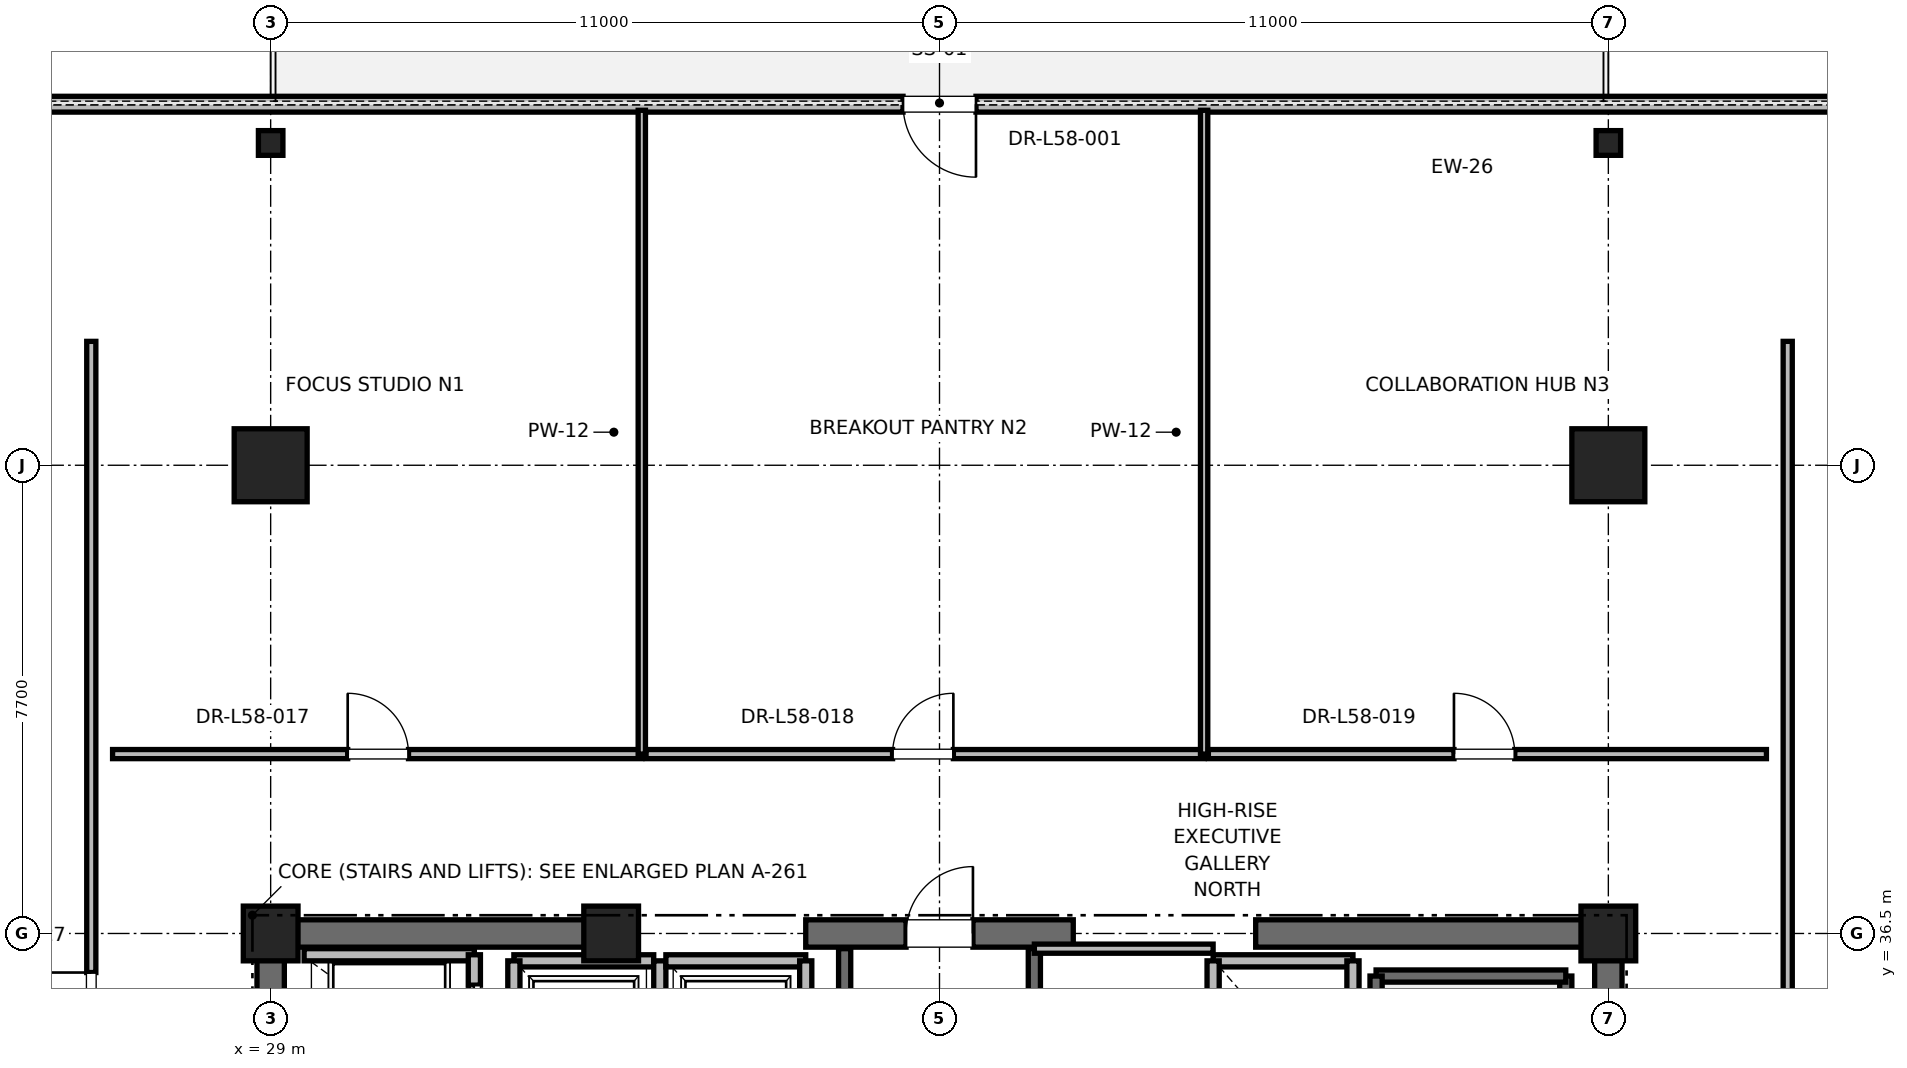
"""IFC4 building model, lengths in metres.
Left out: names, types, materials, properties, quantities, classifications, styles, units other than length and angle.
Written with IfcOpenShell. Run it as: python <this file> out.ifc"""

import sys

from ifc_helpers import new_model, si_unit, direction, frame, frame_2d, origin, origin_2d, place, context, subcontext, project, spatial, rectangle, i_section, extrude, element, fill, save


model = new_model("IFC4")
c1 = context("Model", 3, precision=1e-05, world=origin(), true_north=direction((0.0, 1.0)))
c2 = subcontext(c1, "Body", "Model", "MODEL_VIEW")
j1 = project(units=[si_unit("LENGTHUNIT", "METRE"), si_unit("PLANEANGLEUNIT", "RADIAN")], contexts=[c1])
p1 = place(None, origin())
s1 = spatial("IfcSite", under=j1, at=p1, CompositionType="ELEMENT")
p2 = place(p1, origin())
s2 = spatial("IfcBuilding", under=s1, at=p2, CompositionType="ELEMENT")
p3 = place(p2, frame((0.0, 0.0, 251.2)))
s3 = spatial("IfcBuildingStorey", under=s2, at=p3, CompositionType="ELEMENT", Elevation=251.2)
for number, where, z_axis, x_axis in (
    (1, (29.0, 44.2, 0.0), (0.0, 0.0, 1.0), (1.0, 0.0, 0.0)),
    (2, (51.0, 44.2, 0.0), (0.0, 0.0, 1.0), (1.0, 0.0, 0.0)),
):
    element("IfcColumn", number, at=place(p3, frame(where, z_axis=z_axis, x_axis=x_axis)), inside=s3, PredefinedType="COLUMN", context=c2, shape_type="SweptSolid", body=[
        extrude(rectangle(XDim=1.2, YDim=1.2, at=origin_2d()), origin(), (0.0, 0.0, 1.0), 4.0),
    ])
for number, where, z_axis, x_axis in (
    (3, (29.0, 49.5, 0.0), (0.0, 0.0, 1.0), (1.0, 0.0, 0.0)),
    (4, (51.0, 49.5, 0.0), (0.0, 0.0, 1.0), (1.0, 0.0, 0.0)),
):
    element("IfcColumn", number, at=place(p3, frame(where, z_axis=z_axis, x_axis=x_axis)), inside=s3, PredefinedType="COLUMN", context=c2, shape_type="SweptSolid", body=[
        extrude(i_section(OverallWidth=0.403, OverallDepth=0.406, WebThickness=0.027, FlangeThickness=0.043, FilletRadius=0.015, at=origin_2d()), origin(), (0.0, 0.0, 1.0), 4.0),
    ])
for number, where, z_axis, x_axis in (
    (5, (29.0, 36.5, 0.0), (0.0, 0.0, 1.0), (1.0, 0.0, 0.0)),
    (6, (51.0, 36.5, 0.0), (0.0, 0.0, 1.0), (1.0, 0.0, 0.0)),
    (7, (34.6, 36.5, 0.0), (0.0, 0.0, 1.0), (1.0, 0.0, 0.0)),
):
    element("IfcColumn", number, at=place(p3, frame(where, z_axis=z_axis, x_axis=x_axis)), inside=s3, PredefinedType="PILASTER", context=c2, shape_type="SweptSolid", body=[
        extrude(rectangle(XDim=0.9, YDim=0.9, at=origin_2d()), origin(), (0.0, 0.0, 1.0), 4.0),
    ])
p4 = place(p3, frame((29.0, 36.5, 0.0), z_axis=(0.0, 0.0, 1.0), x_axis=(1.0, 0.0, 0.0)))
e8 = element("IfcWall", 8, at=p4, inside=s3, PredefinedType="SHEAR", context=c2, shape_type="SweptSolid", body=[
    extrude(rectangle(XDim=5.8, YDim=0.45, at=frame_2d((2.9, 0.0))), origin(), (0.0, 0.0, 1.0), 3.785),
])
p5 = place(p3, frame((37.8, 36.5, 0.0), z_axis=(0.0, 0.0, 1.0), x_axis=(1.0, 0.0, 0.0)))
e9 = element("IfcWall", 9, at=p5, inside=s3, PredefinedType="SHEAR", context=c2, shape_type="SweptSolid", body=[
    extrude(rectangle(XDim=4.4, YDim=0.45, at=frame_2d((2.2, 0.0))), origin(), (0.0, 0.0, 1.0), 3.785),
])
p6 = place(p5, frame((1.65, 0.0, 0.0)))
e10 = element("IfcOpeningElement", 10, at=p6, cuts=e9, PredefinedType="OPENING", context=c2, shape_type="SweptSolid", body=[
    extrude(rectangle(XDim=1.1, YDim=2.15, at=frame_2d((0.55, 1.075))), frame((0.0, 0.225, 0.0), z_axis=(0.0, -1.0, 0.0), x_axis=(1.0, 0.0, 0.0)), (0.0, 0.0, 1.0), 0.45),
])
for number, where, z_axis, x_axis in (
    (11, (45.2, 36.5, 0.0), (0.0, 0.0, 1.0), (1.0, 0.0, 0.0)),
    (12, (29.0, 30.7, 0.0), (0.0, 0.0, 1.0), (0.0, 1.0, 0.0)),
):
    element("IfcWall", number, at=place(p3, frame(where, z_axis=z_axis, x_axis=x_axis)), inside=s3, PredefinedType="SHEAR", context=c2, shape_type="SweptSolid", body=[
        extrude(rectangle(XDim=5.8, YDim=0.45, at=frame_2d((2.9, 0.0))), origin(), (0.0, 0.0, 1.0), 3.785),
    ])
p7 = place(p3, frame((51.0, 27.7, 0.0), z_axis=(0.0, 0.0, 1.0), x_axis=(0.0, 1.0, 0.0)))
e13 = element("IfcWall", 13, at=p7, inside=s3, PredefinedType="SHEAR", context=c2, shape_type="SweptSolid", body=[
    extrude(rectangle(XDim=8.8, YDim=0.45, at=frame_2d((4.4, 0.0))), origin(), (0.0, 0.0, 1.0), 3.785),
])
p8 = place(p3, frame((62.396, 50.138, 0.0), z_axis=(0.0, 0.0, 1.0), x_axis=(-1.0, 0.0, 0.0)))
e14 = element("IfcWall", 14, at=p8, inside=s3, PredefinedType="PARAPET", context=c2, shape_type="SweptSolid", body=[
    extrude(rectangle(XDim=44.792, YDim=0.26, at=frame_2d((22.396, 0.0))), origin(), (0.0, 0.0, 1.0), 3.273),
])
p9 = place(p8, frame((4.2, 0.0, 0.85)))
e15 = element("IfcOpeningElement", 15, at=p9, cuts=e14, PredefinedType="OPENING", context=c2, shape_type="SweptSolid", body=[
    extrude(rectangle(XDim=1.6, YDim=2.1, at=frame_2d((0.8, 1.05))), frame((0.0, 0.13, 0.0), z_axis=(0.0, -1.0, 0.0), x_axis=(1.0, 0.0, 0.0)), (0.0, 0.0, 1.0), 0.26),
])
p10 = place(p8, frame((21.796, 0.0, 0.0)))
e16 = element("IfcOpeningElement", 16, at=p10, cuts=e14, PredefinedType="OPENING", context=c2, shape_type="SweptSolid", body=[
    extrude(rectangle(XDim=1.2, YDim=2.2, at=frame_2d((0.6, 1.1))), frame((0.0, 0.13, 0.0), z_axis=(0.0, -1.0, 0.0), x_axis=(1.0, 0.0, 0.0)), (0.0, 0.0, 1.0), 0.26),
])
p11 = place(p8, frame((38.993, 0.0, 0.85)))
e17 = element("IfcOpeningElement", 17, at=p11, cuts=e14, PredefinedType="OPENING", context=c2, shape_type="SweptSolid", body=[
    extrude(rectangle(XDim=1.6, YDim=2.1, at=frame_2d((0.8, 1.05))), frame((0.0, 0.13, 0.0), z_axis=(0.0, -1.0, 0.0), x_axis=(1.0, 0.0, 0.0)), (0.0, 0.0, 1.0), 0.26),
])
p12 = place(p3, frame((50.3, 27.65, 0.0), z_axis=(0.0, 0.0, 1.0), x_axis=(0.0, 1.0, 0.0)))
e18 = element("IfcWall", 18, at=p12, inside=s3, PredefinedType="SOLIDWALL", context=c2, shape_type="SweptSolid", body=[
    extrude(rectangle(XDim=8.15, YDim=0.2, at=frame_2d((4.075, 0.0))), origin(), (0.0, 0.0, 1.0), 3.785),
])
p13 = place(p3, frame((47.18, 35.8, 0.0), z_axis=(0.0, 0.0, 1.0), x_axis=(1.0, 0.0, 0.0)))
e19 = element("IfcWall", 19, at=p13, inside=s3, PredefinedType="SOLIDWALL", context=c2, shape_type="SweptSolid", body=[
    extrude(rectangle(XDim=3.12, YDim=0.2, at=frame_2d((1.56, 0.0))), origin(), (0.0, 0.0, 1.0), 3.785),
])
p14 = place(p3, frame((47.18, 27.62, 0.0), z_axis=(0.0, 0.0, 1.0), x_axis=(0.0, 1.0, 0.0)))
e20 = element("IfcWall", 20, at=p14, inside=s3, PredefinedType="SOLIDWALL", context=c2, shape_type="SweptSolid", body=[
    extrude(rectangle(XDim=8.18, YDim=0.2, at=frame_2d((4.09, 0.0))), origin(), (0.0, 0.0, 1.0), 3.785),
])
p15 = place(p3, frame((38.44, 27.38, 0.0), z_axis=(0.0, 0.0, 1.0), x_axis=(0.0, 1.0, 0.0)))
e21 = element("IfcWall", 21, at=p15, inside=s3, PredefinedType="SOLIDWALL", context=c2, shape_type="SweptSolid", body=[
    extrude(rectangle(XDim=8.87, YDim=0.2, at=frame_2d((4.435, 0.0))), origin(), (0.0, 0.0, 1.0), 3.785),
])
p16 = place(p3, frame((41.56, 27.68, 0.0), z_axis=(0.0, 0.0, 1.0), x_axis=(0.0, 1.0, 0.0)))
e22 = element("IfcWall", 22, at=p16, inside=s3, PredefinedType="SOLIDWALL", context=c2, shape_type="SweptSolid", body=[
    extrude(rectangle(XDim=8.57, YDim=0.2, at=frame_2d((4.285, 0.0))), origin(), (0.0, 0.0, 1.0), 3.785),
])
p17 = place(p3, frame((32.35, 36.15, 0.0), z_axis=(0.0, 0.0, 1.0), x_axis=(-1.0, 0.0, 0.0)))
e23 = element("IfcWall", 23, at=p17, inside=s3, PredefinedType="SOLIDWALL", context=c2, shape_type="SweptSolid", body=[
    extrude(rectangle(XDim=2.8, YDim=0.2, at=frame_2d((1.4, 0.0))), origin(), (0.0, 0.0, 1.0), 3.148),
])
p18 = place(p3, frame((32.35, 34.05, 0.0), z_axis=(0.0, 0.0, 1.0), x_axis=(0.0, 1.0, 0.0)))
e24 = element("IfcWall", 24, at=p18, inside=s3, PredefinedType="SOLIDWALL", context=c2, shape_type="SweptSolid", body=[
    extrude(rectangle(XDim=2.1, YDim=0.2, at=frame_2d((1.05, 0.0))), origin(), (0.0, 0.0, 1.0), 3.785),
])
p19 = place(p18, frame((0.5, 0.0, 0.0)))
e25 = element("IfcOpeningElement", 25, at=p19, cuts=e24, PredefinedType="OPENING", context=c2, shape_type="SweptSolid", body=[
    extrude(rectangle(XDim=1.1, YDim=2.2, at=frame_2d((0.55, 1.1))), frame((0.0, 0.1, 0.0), z_axis=(0.0, -1.0, 0.0), x_axis=(1.0, 0.0, 0.0)), (0.0, 0.0, 1.0), 0.2),
])
p20 = place(p3, frame((35.3, 36.05, 0.0), z_axis=(0.0, 0.0, 1.0), x_axis=(-1.0, 0.0, 0.0)))
e26 = element("IfcWall", 26, at=p20, inside=s3, PredefinedType="SOLIDWALL", context=c2, shape_type="SweptSolid", body=[
    extrude(rectangle(XDim=2.3, YDim=0.2, at=frame_2d((1.15, 0.0))), origin(), (0.0, 0.0, 1.0), 2.865),
])
p21 = place(p3, frame((33.0, 36.05, 0.0), z_axis=(0.0, 0.0, 1.0), x_axis=(0.0, -1.0, 0.0)))
e27 = element("IfcWall", 27, at=p21, inside=s3, PredefinedType="SOLIDWALL", context=c2, shape_type="SweptSolid", body=[
    extrude(rectangle(XDim=2.6, YDim=0.2, at=frame_2d((1.3, 0.0))), origin(), (0.0, 0.0, 1.0), 3.785),
])
p22 = place(p3, frame((35.4, 33.45, 0.0), z_axis=(0.0, 0.0, 1.0), x_axis=(0.0, 1.0, 0.0)))
e28 = element("IfcWall", 28, at=p22, inside=s3, PredefinedType="SOLIDWALL", context=c2, shape_type="SweptSolid", body=[
    extrude(rectangle(XDim=2.6, YDim=0.2, at=frame_2d((1.3, 0.0))), origin(), (0.0, 0.0, 1.0), 2.865),
])
p23 = place(p3, frame((37.8, 36.05, 0.0), z_axis=(0.0, 0.0, 1.0), x_axis=(-1.0, 0.0, 0.0)))
e29 = element("IfcWall", 29, at=p23, inside=s3, PredefinedType="SOLIDWALL", context=c2, shape_type="SweptSolid", body=[
    extrude(rectangle(XDim=2.3, YDim=0.2, at=frame_2d((1.15, 0.0))), origin(), (0.0, 0.0, 1.0), 2.865),
])
p24 = place(p3, frame((37.8, 33.45, 0.0), z_axis=(0.0, 0.0, 1.0), x_axis=(0.0, 1.0, 0.0)))
e30 = element("IfcWall", 30, at=p24, inside=s3, PredefinedType="SOLIDWALL", context=c2, shape_type="SweptSolid", body=[
    extrude(rectangle(XDim=2.6, YDim=0.2, at=frame_2d((1.3, 0.0))), origin(), (0.0, 0.0, 1.0), 2.865),
])
p25 = place(p3, frame((46.8, 36.05, 0.0), z_axis=(0.0, 0.0, 1.0), x_axis=(-1.0, 0.0, 0.0)))
e31 = element("IfcWall", 31, at=p25, inside=s3, PredefinedType="SOLIDWALL", context=c2, shape_type="SweptSolid", body=[
    extrude(rectangle(XDim=2.3, YDim=0.2, at=frame_2d((1.15, 0.0))), origin(), (0.0, 0.0, 1.0), 2.865),
])
p26 = place(p3, frame((44.5, 36.05, 0.0), z_axis=(0.0, 0.0, 1.0), x_axis=(0.0, -1.0, 0.0)))
e32 = element("IfcWall", 32, at=p26, inside=s3, PredefinedType="SOLIDWALL", context=c2, shape_type="SweptSolid", body=[
    extrude(rectangle(XDim=2.6, YDim=0.2, at=frame_2d((1.3, 0.0))), origin(), (0.0, 0.0, 1.0), 2.865),
])
p27 = place(p3, frame((46.8, 33.45, 0.0), z_axis=(0.0, 0.0, 1.0), x_axis=(0.0, 1.0, 0.0)))
e33 = element("IfcWall", 33, at=p27, inside=s3, PredefinedType="SOLIDWALL", context=c2, shape_type="SweptSolid", body=[
    extrude(rectangle(XDim=2.6, YDim=0.2, at=frame_2d((1.3, 0.0))), origin(), (0.0, 0.0, 1.0), 3.785),
])
p28 = place(p3, frame((41.56, 36.25, 0.0), z_axis=(0.0, 0.0, 1.0), x_axis=(1.0, 0.0, 0.0)))
e34 = element("IfcWall", 34, at=p28, inside=s3, PredefinedType="PARTITIONING", context=c2, shape_type="SweptSolid", body=[
    extrude(rectangle(XDim=2.94, YDim=0.15, at=frame_2d((1.47, 0.0))), origin(), (0.0, 0.0, 1.0), 2.85),
])
p29 = place(p3, frame((26.4, 39.45, 0.0), z_axis=(0.0, 0.0, 1.0), x_axis=(1.0, 0.0, 0.0)))
e35 = element("IfcWall", 35, at=p29, inside=s3, PredefinedType="PARTITIONING", context=c2, shape_type="SweptSolid", body=[
    extrude(rectangle(XDim=8.704, YDim=0.15, at=frame_2d((4.352, 0.0))), origin(), (0.0, 0.0, 1.0), 2.85),
])
p30 = place(p29, frame((3.867, 0.0, 0.0)))
e36 = element("IfcOpeningElement", 36, at=p30, cuts=e35, PredefinedType="OPENING", context=c2, shape_type="SweptSolid", body=[
    extrude(rectangle(XDim=1.0, YDim=2.15, at=frame_2d((0.5, 1.075))), frame((0.0, 0.075, 0.0), z_axis=(0.0, -1.0, 0.0), x_axis=(1.0, 0.0, 0.0)), (0.0, 0.0, 1.0), 0.15),
])
p31 = place(p3, frame((35.104, 39.45, 0.0), z_axis=(0.0, 0.0, 1.0), x_axis=(0.0, 1.0, 0.0)))
e37 = element("IfcWall", 37, at=p31, inside=s3, PredefinedType="PARTITIONING", context=c2, shape_type="SweptSolid", body=[
    extrude(rectangle(XDim=10.588, YDim=0.12, at=frame_2d((5.294, 0.0))), origin(), (0.0, 0.0, 1.0), 2.415),
])
p32 = place(p3, frame((35.174, 39.45, 0.0), z_axis=(0.0, 0.0, 1.0), x_axis=(1.0, 0.0, 0.0)))
e38 = element("IfcWall", 38, at=p32, inside=s3, PredefinedType="PARTITIONING", context=c2, shape_type="SweptSolid", body=[
    extrude(rectangle(XDim=9.178, YDim=0.15, at=frame_2d((4.589, 0.0))), origin(), (0.0, 0.0, 1.0), 2.85),
])
p33 = place(p32, frame((4.054, 0.0, 0.0)))
e39 = element("IfcOpeningElement", 39, at=p33, cuts=e38, PredefinedType="OPENING", context=c2, shape_type="SweptSolid", body=[
    extrude(rectangle(XDim=1.0, YDim=2.15, at=frame_2d((0.5, 1.075))), frame((0.0, 0.075, 0.0), z_axis=(0.0, -1.0, 0.0), x_axis=(1.0, 0.0, 0.0)), (0.0, 0.0, 1.0), 0.15),
])
p34 = place(p3, frame((44.352, 39.45, 0.0), z_axis=(0.0, 0.0, 1.0), x_axis=(0.0, 1.0, 0.0)))
e40 = element("IfcWall", 40, at=p34, inside=s3, PredefinedType="PARTITIONING", context=c2, shape_type="SweptSolid", body=[
    extrude(rectangle(XDim=10.588, YDim=0.12, at=frame_2d((5.294, 0.0))), origin(), (0.0, 0.0, 1.0), 2.415),
])
p35 = place(p3, frame((44.422, 39.45, 0.0), z_axis=(0.0, 0.0, 1.0), x_axis=(1.0, 0.0, 0.0)))
e41 = element("IfcWall", 41, at=p35, inside=s3, PredefinedType="PARTITIONING", context=c2, shape_type="SweptSolid", body=[
    extrude(rectangle(XDim=9.178, YDim=0.15, at=frame_2d((4.589, 0.0))), origin(), (0.0, 0.0, 1.0), 2.85),
])
p36 = place(p35, frame((4.039, 0.0, 0.0)))
e42 = element("IfcOpeningElement", 42, at=p36, cuts=e41, PredefinedType="OPENING", context=c2, shape_type="SweptSolid", body=[
    extrude(rectangle(XDim=1.0, YDim=2.15, at=frame_2d((0.5, 1.075))), frame((0.0, 0.075, 0.0), z_axis=(0.0, -1.0, 0.0), x_axis=(1.0, 0.0, 0.0)), (0.0, 0.0, 1.0), 0.15),
])
p37 = place(p3, frame((26.05, 34.315, 0.0), z_axis=(0.0, 0.0, 1.0), x_axis=(0.0, 1.0, 0.0)))
e43 = element("IfcWall", 43, at=p37, inside=s3, PredefinedType="PARTITIONING", context=c2, shape_type="SweptSolid", body=[
    extrude(rectangle(XDim=11.922, YDim=0.15, at=frame_2d((5.961, 0.0))), origin(), (0.0, 0.0, 1.0), 2.85),
])
p38 = place(p37, frame((0.542, 0.0, 0.0)))
e44 = element("IfcOpeningElement", 44, at=p38, cuts=e43, PredefinedType="OPENING", context=c2, shape_type="SweptSolid", body=[
    extrude(rectangle(XDim=1.0, YDim=2.15, at=frame_2d((0.5, 1.075))), frame((0.0, 0.075, 0.0), z_axis=(0.0, -1.0, 0.0), x_axis=(1.0, 0.0, 0.0)), (0.0, 0.0, 1.0), 0.15),
])
p39 = place(p3, frame((53.95, 8.762, 0.0), z_axis=(0.0, 0.0, 1.0), x_axis=(0.0, 1.0, 0.0)))
e45 = element("IfcWall", 45, at=p39, inside=s3, PredefinedType="PARTITIONING", context=c2, shape_type="SweptSolid", body=[
    extrude(rectangle(XDim=37.475, YDim=0.15, at=frame_2d((18.738, 0.0))), origin(), (0.0, 0.0, 1.0), 2.85),
])
p40 = place(p39, frame((18.238, 0.0, 0.0)))
e46 = element("IfcOpeningElement", 46, at=p40, cuts=e45, PredefinedType="OPENING", context=c2, shape_type="SweptSolid", body=[
    extrude(rectangle(XDim=1.0, YDim=2.15, at=frame_2d((0.5, 1.075))), frame((0.0, 0.075, 0.0), z_axis=(0.0, -1.0, 0.0), x_axis=(1.0, 0.0, 0.0)), (0.0, 0.0, 1.0), 0.15),
])
p41 = place(p10, origin())
e47 = element("IfcDoor", 47, at=p41, inside=s3, OperationType="SINGLE_SWING_LEFT", PredefinedType="DOOR", context=c2, shape_type="SweptSolid", body=[
    extrude(rectangle(XDim=1.2, YDim=2.2, at=frame_2d((0.6, 1.1))), frame((0.0, 0.025, 0.0), z_axis=(0.0, -1.0, 0.0), x_axis=(1.0, 0.0, 0.0)), (0.0, 0.0, 1.0), 0.05),
])
fill(e16, e47)
p42 = place(p6, origin())
e48 = element("IfcDoor", 48, at=p42, inside=s3, OperationType="SINGLE_SWING_RIGHT", PredefinedType="DOOR", context=c2, shape_type="SweptSolid", body=[
    extrude(rectangle(XDim=1.1, YDim=2.15, at=frame_2d((0.55, 1.075))), frame((0.0, 0.025, 0.0), z_axis=(0.0, -1.0, 0.0), x_axis=(1.0, 0.0, 0.0)), (0.0, 0.0, 1.0), 0.05),
])
fill(e10, e48)
p43 = place(p19, origin())
e49 = element("IfcDoor", 49, at=p43, inside=s3, OperationType="SLIDING_TO_RIGHT", PredefinedType="DOOR", context=c2, shape_type="SweptSolid", body=[
    extrude(rectangle(XDim=1.1, YDim=2.2, at=frame_2d((0.55, 1.1))), frame((0.0, 0.025, 0.0), z_axis=(0.0, -1.0, 0.0), x_axis=(1.0, 0.0, 0.0)), (0.0, 0.0, 1.0), 0.05),
])
fill(e25, e49)
p44 = place(p30, origin())
e50 = element("IfcDoor", 50, at=p44, inside=s3, OperationType="SINGLE_SWING_LEFT", PredefinedType="DOOR", context=c2, shape_type="SweptSolid", body=[
    extrude(rectangle(XDim=1.0, YDim=2.15, at=frame_2d((0.5, 1.075))), frame((0.0, 0.025, 0.0), z_axis=(0.0, -1.0, 0.0), x_axis=(1.0, 0.0, 0.0)), (0.0, 0.0, 1.0), 0.05),
])
fill(e36, e50)
p45 = place(p33, origin())
e51 = element("IfcDoor", 51, at=p45, inside=s3, OperationType="SINGLE_SWING_RIGHT", PredefinedType="DOOR", context=c2, shape_type="SweptSolid", body=[
    extrude(rectangle(XDim=1.0, YDim=2.15, at=frame_2d((0.5, 1.075))), frame((0.0, 0.025, 0.0), z_axis=(0.0, -1.0, 0.0), x_axis=(1.0, 0.0, 0.0)), (0.0, 0.0, 1.0), 0.05),
])
fill(e39, e51)
p46 = place(p36, origin())
e52 = element("IfcDoor", 52, at=p46, inside=s3, OperationType="SINGLE_SWING_LEFT", PredefinedType="DOOR", context=c2, shape_type="SweptSolid", body=[
    extrude(rectangle(XDim=1.0, YDim=2.15, at=frame_2d((0.5, 1.075))), frame((0.0, 0.025, 0.0), z_axis=(0.0, -1.0, 0.0), x_axis=(1.0, 0.0, 0.0)), (0.0, 0.0, 1.0), 0.05),
])
fill(e42, e52)
p47 = place(p38, origin())
e53 = element("IfcDoor", 53, at=p47, inside=s3, OperationType="SINGLE_SWING_RIGHT", PredefinedType="DOOR", context=c2, shape_type="SweptSolid", body=[
    extrude(rectangle(XDim=1.0, YDim=2.15, at=frame_2d((0.5, 1.075))), frame((0.0, 0.025, 0.0), z_axis=(0.0, -1.0, 0.0), x_axis=(1.0, 0.0, 0.0)), (0.0, 0.0, 1.0), 0.05),
])
fill(e44, e53)
save(model, sys.argv[1])
